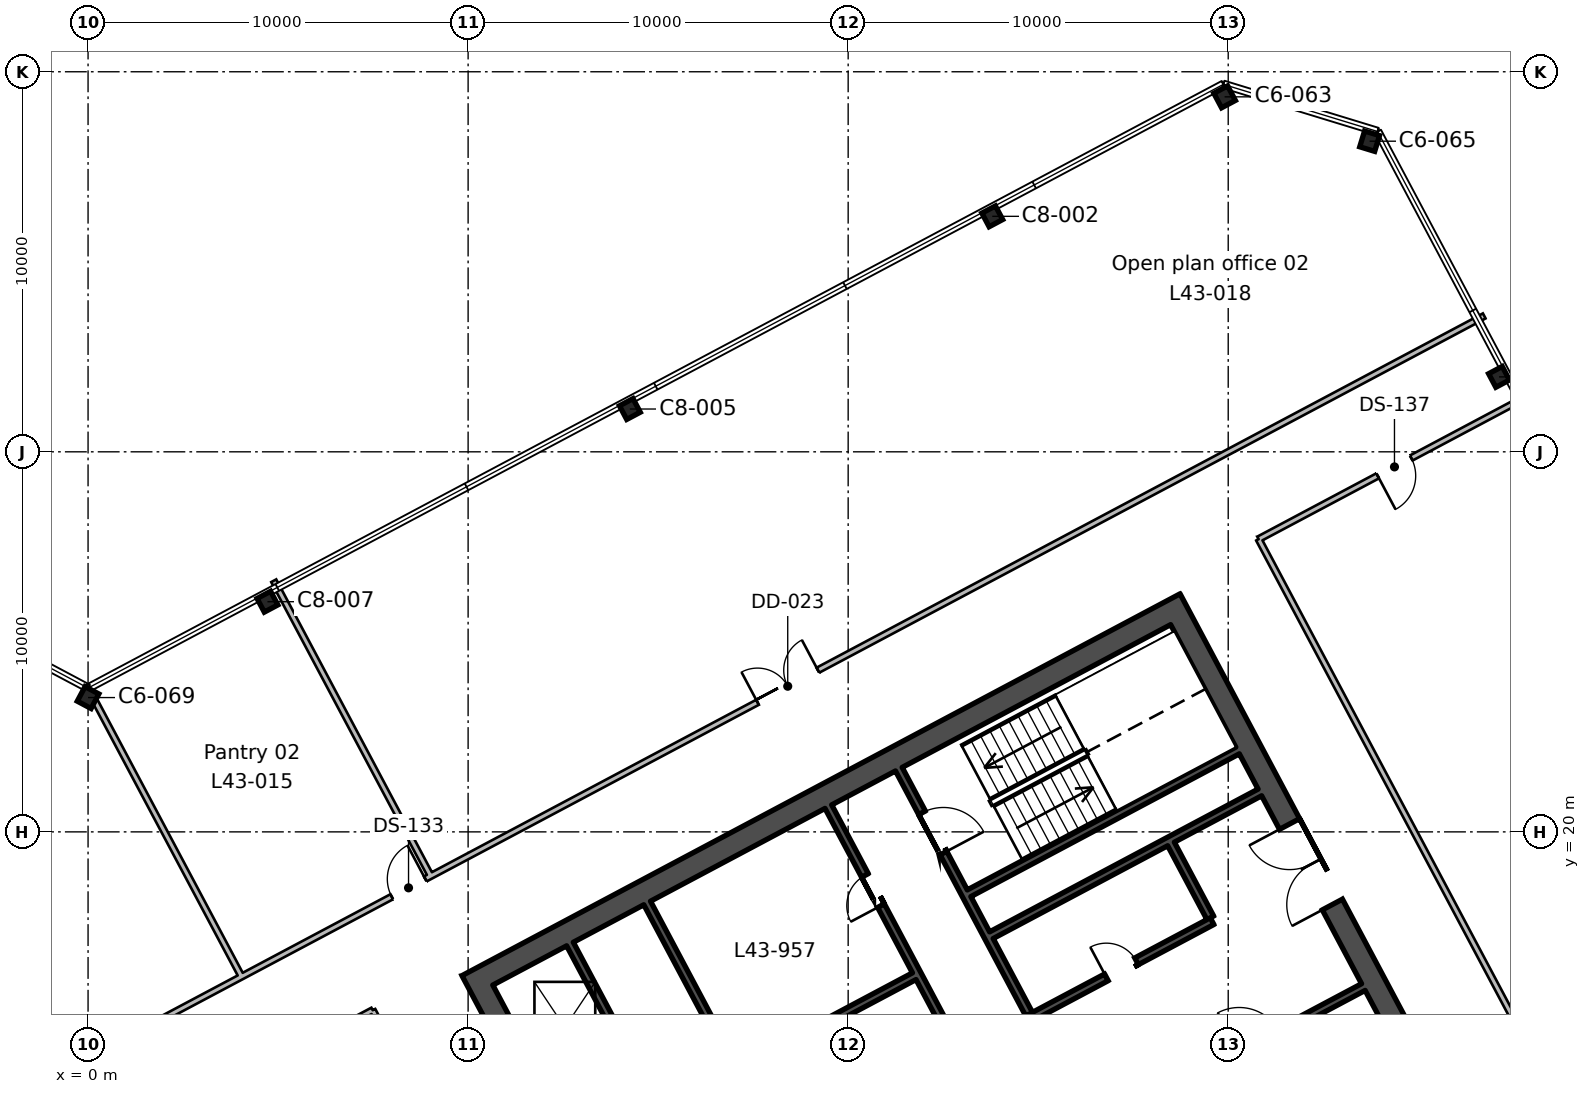
"""IFC4 building model, lengths in metres.
Left out: names, types, materials, properties, quantities, classifications, styles, units other than length and angle.
Written with IfcOpenShell. Run it as: python <this file> out.ifc"""

import sys

from ifc_helpers import new_model, si_unit, direction, frame, frame_2d, origin, origin_2d, place, context, subcontext, project, spatial, rectangle, i_section, extrude, element, fill, save


model = new_model("IFC4")
c1 = context("Model", 3, precision=1e-05, world=origin(), true_north=direction((0.0, 1.0)))
c2 = subcontext(c1, "Body", "Model", "MODEL_VIEW")
j1 = project(units=[si_unit("LENGTHUNIT", "METRE"), si_unit("PLANEANGLEUNIT", "RADIAN")], contexts=[c1])
p1 = place(None, origin())
s1 = spatial("IfcSite", under=j1, at=p1, CompositionType="ELEMENT")
p2 = place(p1, origin())
s2 = spatial("IfcBuilding", under=s1, at=p2, CompositionType="ELEMENT")
p3 = place(p2, frame((0.0, 0.0, 201.3)))
s3 = spatial("IfcBuildingStorey", under=s2, at=p3, CompositionType="ELEMENT", Elevation=201.3)
p4 = place(p3, frame((0.0, 23.534, 0.0), z_axis=(0.0, 0.0, 1.0), x_axis=(-0.882947592859, 0.469471562786, 0.0)))
e1 = element("IfcColumn", 1, at=p4, inside=s3, PredefinedType="COLUMN", context=c2, shape_type="SweptSolid", body=[
    extrude(i_section(OverallWidth=0.412, OverallDepth=0.434, WebThickness=0.036, FlangeThickness=0.057, FilletRadius=0.015, at=origin_2d()), origin(), (0.0, 0.0, 1.0), 3.9),
])
for number, where, z_axis, x_axis in (
    (2, (4.72, 26.056, 0.0), (0.0, 0.0, 1.0), (-0.883, -0.469, 0.0)),
    (3, (14.256, 31.126, 0.0), (0.0, 0.0, 1.0), (-0.883, -0.469, 0.0)),
    (4, (37.126, 31.972, 0.0), (0.0, 0.0, 1.0), (-0.469, 0.883, 0.0)),
    (5, (23.792, 36.196, 0.0), (0.0, 0.0, 1.0), (-0.883, -0.469, 0.0)),
):
    element("IfcColumn", number, at=place(p3, frame(where, z_axis=z_axis, x_axis=x_axis)), inside=s3, PredefinedType="COLUMN", context=c2, shape_type="SweptSolid", body=[
        extrude(i_section(OverallWidth=0.404, OverallDepth=0.406, WebThickness=0.027, FlangeThickness=0.044, FilletRadius=0.015, at=origin_2d()), origin(), (0.0, 0.0, 1.0), 3.9),
    ])
for number, where, z_axis, x_axis in (
    (6, (33.721, 38.173, 0.0), (0.0, 0.0, 1.0), (-0.956, 0.292, 0.0)),
    (7, (29.905, 39.34, 0.0), (0.0, 0.0, 1.0), (-0.883, -0.469, 0.0)),
):
    element("IfcColumn", number, at=place(p3, frame(where, z_axis=z_axis, x_axis=x_axis)), inside=s3, PredefinedType="COLUMN", context=c2, shape_type="SweptSolid", body=[
        extrude(i_section(OverallWidth=0.412, OverallDepth=0.434, WebThickness=0.036, FlangeThickness=0.057, FilletRadius=0.015, at=origin_2d()), origin(), (0.0, 0.0, 1.0), 3.9),
    ])
p5 = place(p3, frame((19.211, -0.771, 0.0), z_axis=(0.0, 0.0, 1.0), x_axis=(-0.469463742137, 0.882951751127, 0.0)))
e8 = element("IfcWall", 8, at=p5, inside=s3, PredefinedType="SHEAR", context=c2, shape_type="SweptSolid", body=[
    extrude(rectangle(XDim=19.4, YDim=0.6, at=frame_2d((9.7, 0.0))), origin(), (0.0, 0.0, 1.0), 3.9),
])
p6 = place(p5, frame((6.7, 0.0, 0.0)))
e9 = element("IfcOpeningElement", 9, at=p6, cuts=e8, PredefinedType="OPENING", context=c2, shape_type="SweptSolid", body=[
    extrude(rectangle(XDim=2.4, YDim=2.4, at=frame_2d((1.2, 1.2))), frame((0.0, 0.31, 0.0), z_axis=(0.0, -1.0, 0.0), x_axis=(1.0, 0.0, 0.0)), (0.0, 0.0, 1.0), 0.62),
])
p7 = place(p3, frame((37.576, 8.994, 0.0), z_axis=(0.0, 0.0, 1.0), x_axis=(-0.469478769487, 0.88294376095, 0.0)))
e10 = element("IfcWall", 10, at=p7, inside=s3, PredefinedType="SHEAR", context=c2, shape_type="SweptSolid", body=[
    extrude(rectangle(XDim=19.4, YDim=0.6, at=frame_2d((9.7, 0.0))), origin(), (0.0, 0.0, 1.0), 3.9),
])
p8 = place(p7, frame((10.3, 0.0, 0.0)))
e11 = element("IfcOpeningElement", 11, at=p8, cuts=e10, PredefinedType="OPENING", context=c2, shape_type="SweptSolid", body=[
    extrude(rectangle(XDim=2.4, YDim=2.4, at=frame_2d((1.2, 1.2))), frame((0.0, 0.31, 0.0), z_axis=(0.0, -1.0, 0.0), x_axis=(1.0, 0.0, 0.0)), (0.0, 0.0, 1.0), 0.62),
])
p9 = place(p3, frame((10.509, 16.234, 0.0), z_axis=(0.0, 0.0, 1.0), x_axis=(0.88295010195, 0.469466843842, 0.0)))
e12 = element("IfcWall", 12, at=p9, inside=s3, PredefinedType="SHEAR", context=c2, shape_type="SweptSolid", body=[
    extrude(rectangle(XDim=20.2, YDim=0.6, at=frame_2d((10.1, 0.0))), origin(), (0.0, 0.0, 1.0), 3.9),
])
p10 = place(p3, frame((14.394, 13.826, 0.0), z_axis=(0.0, 0.0, 1.0), x_axis=(-0.469494272526, 0.882935517501, 0.0)))
e13 = element("IfcWall", 13, at=p10, inside=s3, PredefinedType="SHEAR", context=c2, shape_type="SweptSolid", body=[
    extrude(rectangle(XDim=3.65, YDim=0.2, at=frame_2d((1.825, 0.0))), origin(), (0.0, 0.0, 1.0), 3.9),
])
p11 = place(p3, frame((18.138, 11.683, 0.0), z_axis=(0.0, 0.0, 1.0), x_axis=(-0.469480409012, 0.88294288918, 0.0)))
e14 = element("IfcWall", 14, at=p11, inside=s3, PredefinedType="SHEAR", context=c2, shape_type="SweptSolid", body=[
    extrude(rectangle(XDim=7.3, YDim=0.2, at=frame_2d((3.65, 0.0))), origin(), (0.0, 0.0, 1.0), 3.9),
])
p12 = place(p3, frame((22.906, 14.218, 0.0), z_axis=(0.0, 0.0, 1.0), x_axis=(-0.469480409012, 0.88294288918, 0.0)))
e15 = element("IfcWall", 15, at=p12, inside=s3, PredefinedType="SHEAR", context=c2, shape_type="SweptSolid", body=[
    extrude(rectangle(XDim=7.3, YDim=0.2, at=frame_2d((3.65, 0.0))), origin(), (0.0, 0.0, 1.0), 3.9),
])
p13 = place(p12, frame((4.35, 0.0, 0.0)))
e16 = element("IfcOpeningElement", 16, at=p13, cuts=e15, PredefinedType="OPENING", context=c2, shape_type="SweptSolid", body=[
    extrude(rectangle(XDim=0.9, YDim=2.1, at=frame_2d((0.45, 1.05))), frame((0.0, 0.11, 0.0), z_axis=(0.0, -1.0, 0.0), x_axis=(1.0, 0.0, 0.0)), (0.0, 0.0, 1.0), 0.22),
])
p14 = place(p3, frame((24.76, 15.204, 0.0), z_axis=(0.0, 0.0, 1.0), x_axis=(-0.469494272526, 0.882935517501, 0.0)))
e17 = element("IfcWall", 17, at=p14, inside=s3, PredefinedType="SHEAR", context=c2, shape_type="SweptSolid", body=[
    extrude(rectangle(XDim=7.3, YDim=0.2, at=frame_2d((3.65, 0.0))), origin(), (0.0, 0.0, 1.0), 3.9),
])
p15 = place(p14, frame((4.8, 0.0, 0.0)))
e18 = element("IfcOpeningElement", 18, at=p15, cuts=e17, PredefinedType="OPENING", context=c2, shape_type="SweptSolid", body=[
    extrude(rectangle(XDim=1.2, YDim=2.1, at=frame_2d((0.6, 1.05))), frame((0.0, 0.11, 0.0), z_axis=(0.0, -1.0, 0.0), x_axis=(1.0, 0.0, 0.0)), (0.0, 0.0, 1.0), 0.22),
])
p16 = place(p3, frame((29.528, 17.739, 0.0), z_axis=(0.0, 0.0, 1.0), x_axis=(-0.469401318492, 0.882984938828, 0.0)))
e19 = element("IfcWall", 19, at=p16, inside=s3, PredefinedType="SHEAR", context=c2, shape_type="SweptSolid", body=[
    extrude(rectangle(XDim=2.2, YDim=0.2, at=frame_2d((1.1, 0.0))), origin(), (0.0, 0.0, 1.0), 3.9),
])
p17 = place(p3, frame((24.726, 11.222, 0.0), z_axis=(0.0, 0.0, 1.0), x_axis=(0.882940221191, 0.469485426614, 0.0)))
e20 = element("IfcWall", 20, at=p17, inside=s3, PredefinedType="SHEAR", context=c2, shape_type="SweptSolid", body=[
    extrude(rectangle(XDim=10.0, YDim=0.2, at=frame_2d((5.0, 0.0))), origin(), (0.0, 0.0, 1.0), 3.9),
])
p18 = place(p17, frame((6.3, 0.0, 0.0)))
e21 = element("IfcOpeningElement", 21, at=p18, cuts=e20, PredefinedType="OPENING", context=c2, shape_type="SweptSolid", body=[
    extrude(rectangle(XDim=1.2, YDim=2.1, at=frame_2d((0.6, 1.05))), frame((0.0, 0.11, 0.0), z_axis=(0.0, -1.0, 0.0), x_axis=(1.0, 0.0, 0.0)), (0.0, 0.0, 1.0), 0.22),
])
p19 = place(p17, frame((2.25, 0.0, 0.0)))
e22 = element("IfcOpeningElement", 22, at=p19, cuts=e20, PredefinedType="OPENING", context=c2, shape_type="SweptSolid", body=[
    extrude(rectangle(XDim=0.9, YDim=2.1, at=frame_2d((0.45, 1.05))), frame((0.0, 0.11, 0.0), z_axis=(0.0, -1.0, 0.0), x_axis=(1.0, 0.0, 0.0)), (0.0, 0.0, 1.0), 0.22),
])
p20 = place(p3, frame((24.807, 15.116, 0.0), z_axis=(0.0, 0.0, 1.0), x_axis=(0.882942972946, 0.469480251476, 0.0)))
e23 = element("IfcWall", 23, at=p20, inside=s3, PredefinedType="SHEAR", context=c2, shape_type="SweptSolid", body=[
    extrude(rectangle(XDim=5.4, YDim=0.2, at=frame_2d((2.7, 0.0))), origin(), (0.0, 0.0, 1.0), 3.9),
])
p21 = place(p20, frame((2.25, 0.0, 0.0)))
e24 = element("IfcOpeningElement", 24, at=p21, cuts=e23, PredefinedType="OPENING", context=c2, shape_type="SweptSolid", body=[
    extrude(rectangle(XDim=0.9, YDim=2.1, at=frame_2d((0.45, 1.05))), frame((0.0, 0.11, 0.0), z_axis=(0.0, -1.0, 0.0), x_axis=(1.0, 0.0, 0.0)), (0.0, 0.0, 1.0), 0.22),
])
p22 = place(p3, frame((17.147, 13.761, 0.0), z_axis=(0.0, 0.0, 1.0), x_axis=(0.882964314875, 0.469440111896, 0.0)))
e25 = element("IfcWall", 25, at=p22, inside=s3, PredefinedType="SHEAR", context=c2, shape_type="SweptSolid", body=[
    extrude(rectangle(XDim=5.2, YDim=0.2, at=frame_2d((2.6, 0.0))), origin(), (0.0, 0.0, 1.0), 3.9),
])
p23 = place(p3, frame((23.769, 17.282, 0.0), z_axis=(0.0, 0.0, 1.0), x_axis=(0.882940221191, 0.469485426614, 0.0)))
e26 = element("IfcWall", 26, at=p23, inside=s3, PredefinedType="SHEAR", context=c2, shape_type="SweptSolid", body=[
    extrude(rectangle(XDim=8.0, YDim=0.2, at=frame_2d((4.0, 0.0))), origin(), (0.0, 0.0, 1.0), 3.9),
])
p24 = place(p3, frame((23.182, 18.385, 0.0), z_axis=(0.0, 0.0, 1.0), x_axis=(0.88295287151, 0.469461634952, 0.0)))
e27 = element("IfcWall", 27, at=p24, inside=s3, PredefinedType="SHEAR", context=c2, shape_type="SweptSolid", body=[
    extrude(rectangle(XDim=8.0, YDim=0.2, at=frame_2d((4.0, 0.0))), origin(), (0.0, 0.0, 1.0), 3.9),
])
p25 = place(p3, frame((-48.541, 39.854, 0.0), z_axis=(0.0, 0.0, 1.0), x_axis=(0.882945008423, -0.469476423372, 0.0)))
e28 = element("IfcWall", 28, at=p25, inside=s3, PredefinedType="PARTITIONING", context=c2, shape_type="SweptSolid", body=[
    extrude(rectangle(XDim=54.976, YDim=0.15, at=frame_2d((27.488, 0.0))), origin(), (0.0, 0.0, 1.0), 3.54),
])
p26 = place(p25, frame((39.35, 0.0, 0.0)))
e29 = element("IfcOpeningElement", 29, at=p26, cuts=e28, PredefinedType="OPENING", context=c2, shape_type="SweptSolid", body=[
    extrude(rectangle(XDim=1.0, YDim=2.1, at=frame_2d((0.5, 1.05))), frame((0.0, 0.085, 0.0), z_axis=(0.0, -1.0, 0.0), x_axis=(1.0, 0.0, 0.0)), (0.0, 0.0, 1.0), 0.17),
])
p27 = place(p25, frame((28.05, 0.0, 0.0)))
e30 = element("IfcOpeningElement", 30, at=p27, cuts=e28, PredefinedType="OPENING", context=c2, shape_type="SweptSolid", body=[
    extrude(rectangle(XDim=1.0, YDim=2.1, at=frame_2d((0.5, 1.05))), frame((0.0, 0.085, 0.0), z_axis=(0.0, -1.0, 0.0), x_axis=(1.0, 0.0, 0.0)), (0.0, 0.0, 1.0), 0.17),
])
p28 = place(p25, frame((26.449, 0.0, 0.0)))
e31 = element("IfcOpeningElement", 31, at=p28, cuts=e28, PredefinedType="OPENING", context=c2, shape_type="SweptSolid", body=[
    extrude(rectangle(XDim=1.0, YDim=2.1, at=frame_2d((0.5, 1.05))), frame((0.0, 0.085, 0.0), z_axis=(0.0, -1.0, 0.0), x_axis=(1.0, 0.0, 0.0)), (0.0, 0.0, 1.0), 0.17),
])
p29 = place(p25, frame((15.35, 0.0, 0.0)))
e32 = element("IfcOpeningElement", 32, at=p29, cuts=e28, PredefinedType="OPENING", context=c2, shape_type="SweptSolid", body=[
    extrude(rectangle(XDim=1.0, YDim=2.1, at=frame_2d((0.5, 1.05))), frame((0.0, 0.085, 0.0), z_axis=(0.0, -1.0, 0.0), x_axis=(1.0, 0.0, 0.0)), (0.0, 0.0, 1.0), 0.17),
])
p30 = place(p3, frame((0.0, 14.044, 0.0), z_axis=(0.0, 0.0, 1.0), x_axis=(0.882962129795, 0.469444221764, 0.0)))
e33 = element("IfcWall", 33, at=p30, inside=s3, PredefinedType="PARTITIONING", context=c2, shape_type="SweptSolid", body=[
    extrude(rectangle(XDim=41.607, YDim=0.15, at=frame_2d((20.803, 0.0))), origin(), (0.0, 0.0, 1.0), 3.54),
])
p31 = place(p30, frame((19.95, 0.0, 0.0)))
e34 = element("IfcOpeningElement", 34, at=p31, cuts=e33, PredefinedType="OPENING", context=c2, shape_type="SweptSolid", body=[
    extrude(rectangle(XDim=1.8, YDim=2.1, at=frame_2d((0.9, 1.05))), frame((0.0, 0.085, 0.0), z_axis=(0.0, -1.0, 0.0), x_axis=(1.0, 0.0, 0.0)), (0.0, 0.0, 1.0), 0.17),
])
p32 = place(p30, frame((9.05, 0.0, 0.0)))
e35 = element("IfcOpeningElement", 35, at=p32, cuts=e33, PredefinedType="OPENING", context=c2, shape_type="SweptSolid", body=[
    extrude(rectangle(XDim=1.0, YDim=2.1, at=frame_2d((0.5, 1.05))), frame((0.0, 0.085, 0.0), z_axis=(0.0, -1.0, 0.0), x_axis=(1.0, 0.0, 0.0)), (0.0, 0.0, 1.0), 0.17),
])
p33 = place(p3, frame((0.183, 23.44, 0.0), z_axis=(0.0, 0.0, 1.0), x_axis=(0.469529135479, -0.882916978507, 0.0)))
e36 = element("IfcWall", 36, at=p33, inside=s3, PredefinedType="PARTITIONING", context=c2, shape_type="SweptSolid", body=[
    extrude(rectangle(XDim=8.21, YDim=0.15, at=frame_2d((4.105, 0.0))), origin(), (0.0, 0.0, 1.0), 3.54),
])
p34 = place(p3, frame((4.885, 26.608, 0.0), z_axis=(0.0, 0.0, 1.0), x_axis=(0.469445946219, -0.882961212952, 0.0)))
e37 = element("IfcWall", 37, at=p34, inside=s3, PredefinedType="PARTITIONING", context=c2, shape_type="SweptSolid", body=[
    extrude(rectangle(XDim=8.8, YDim=0.15, at=frame_2d((4.4, 0.0))), origin(), (0.0, 0.0, 1.0), 3.54),
])
p35 = place(p3, frame((37.863, 31.458, 0.0), z_axis=(0.0, 0.0, 1.0), x_axis=(-0.882914115089, -0.469534519898, 0.0)))
e38 = element("IfcWall", 38, at=p35, inside=s3, PredefinedType="PARTITIONING", context=c2, shape_type="SweptSolid", body=[
    extrude(rectangle(XDim=8.0, YDim=0.15, at=frame_2d((4.0, 0.0))), origin(), (0.0, 0.0, 1.0), 3.54),
])
p36 = place(p35, frame((3.451, 0.0, 0.0)))
e39 = element("IfcOpeningElement", 39, at=p36, cuts=e38, PredefinedType="OPENING", context=c2, shape_type="SweptSolid", body=[
    extrude(rectangle(XDim=1.0, YDim=2.1, at=frame_2d((0.5, 1.05))), frame((0.0, 0.085, 0.0), z_axis=(0.0, -1.0, 0.0), x_axis=(1.0, 0.0, 0.0)), (0.0, 0.0, 1.0), 0.17),
])
p37 = place(p3, frame((30.8, 27.702, 0.0), z_axis=(0.0, 0.0, 1.0), x_axis=(0.469451816494, -0.882958091865, 0.0)))
e40 = element("IfcWall", 40, at=p37, inside=s3, PredefinedType="PARTITIONING", context=c2, shape_type="SweptSolid", body=[
    extrude(rectangle(XDim=20.0, YDim=0.15, at=frame_2d((10.0, 0.0))), origin(), (0.0, 0.0, 1.0), 3.54),
])
p38 = place(p3, frame((8.292, 13.8, 0.0), z_axis=(0.0, 0.0, 1.0), x_axis=(-0.469541856947, 0.882910213201, 0.0)))
e41 = element("IfcWall", 41, at=p38, inside=s3, PredefinedType="PARTITIONING", context=c2, shape_type="SweptSolid", body=[
    extrude(rectangle(XDim=1.708, YDim=0.15, at=frame_2d((0.854, 0.0))), origin(), (0.0, 0.0, 1.0), 3.54),
])
p39 = place(p3, frame((7.49, 15.308, 0.0), z_axis=(0.0, 0.0, 1.0), x_axis=(-0.882993690295, -0.469384855848, 0.0)))
e42 = element("IfcWall", 42, at=p39, inside=s3, PredefinedType="PARTITIONING", context=c2, shape_type="SweptSolid", body=[
    extrude(rectangle(XDim=3.213, YDim=0.15, at=frame_2d((1.606, 0.0))), origin(), (0.0, 0.0, 1.0), 3.54),
])
p40 = place(p8, origin())
e43 = element("IfcDoor", 43, at=p40, inside=s3, OperationType="DOUBLE_DOOR_SINGLE_SWING", PredefinedType="DOOR", context=c2, shape_type="SweptSolid", body=[
    extrude(rectangle(XDim=2.4, YDim=2.4, at=frame_2d((1.2, 1.2))), frame((0.0, 0.025, 0.0), z_axis=(0.0, -1.0, 0.0), x_axis=(1.0, 0.0, 0.0)), (0.0, 0.0, 1.0), 0.05),
])
fill(e11, e43)
p41 = place(p15, frame((1.2, 0.0, 0.0), z_axis=(0.0, 0.0, 1.0), x_axis=(-1.0, 0.0, 0.0)))
e44 = element("IfcDoor", 44, at=p41, inside=s3, OperationType="SINGLE_SWING_RIGHT", PredefinedType="DOOR", context=c2, shape_type="SweptSolid", body=[
    extrude(rectangle(XDim=1.2, YDim=2.1, at=frame_2d((0.6, 1.05))), frame((0.0, 0.025, 0.0), z_axis=(0.0, -1.0, 0.0), x_axis=(1.0, 0.0, 0.0)), (0.0, 0.0, 1.0), 0.05),
])
fill(e18, e44)
p42 = place(p21, origin())
e45 = element("IfcDoor", 45, at=p42, inside=s3, OperationType="SINGLE_SWING_LEFT", PredefinedType="DOOR", context=c2, shape_type="SweptSolid", body=[
    extrude(rectangle(XDim=0.9, YDim=2.1, at=frame_2d((0.45, 1.05))), frame((0.0, 0.025, 0.0), z_axis=(0.0, -1.0, 0.0), x_axis=(1.0, 0.0, 0.0)), (0.0, 0.0, 1.0), 0.05),
])
fill(e24, e45)
p43 = place(p13, origin())
e46 = element("IfcDoor", 46, at=p43, inside=s3, OperationType="SINGLE_SWING_LEFT", PredefinedType="DOOR", context=c2, shape_type="SweptSolid", body=[
    extrude(rectangle(XDim=0.9, YDim=2.1, at=frame_2d((0.45, 1.05))), frame((0.0, 0.025, 0.0), z_axis=(0.0, -1.0, 0.0), x_axis=(1.0, 0.0, 0.0)), (0.0, 0.0, 1.0), 0.05),
])
fill(e16, e46)
p44 = place(p31, origin())
e47 = element("IfcDoor", 47, at=p44, inside=s3, OperationType="DOUBLE_DOOR_SINGLE_SWING", PredefinedType="DOOR", context=c2, shape_type="SweptSolid", body=[
    extrude(rectangle(XDim=1.8, YDim=2.1, at=frame_2d((0.9, 1.05))), frame((0.0, 0.025, 0.0), z_axis=(0.0, -1.0, 0.0), x_axis=(1.0, 0.0, 0.0)), (0.0, 0.0, 1.0), 0.05),
])
fill(e34, e47)
p45 = place(p32, origin())
e48 = element("IfcDoor", 48, at=p45, inside=s3, OperationType="SINGLE_SWING_RIGHT", PredefinedType="DOOR", context=c2, shape_type="SweptSolid", body=[
    extrude(rectangle(XDim=1.0, YDim=2.1, at=frame_2d((0.5, 1.05))), frame((0.0, 0.025, 0.0), z_axis=(0.0, -1.0, 0.0), x_axis=(1.0, 0.0, 0.0)), (0.0, 0.0, 1.0), 0.05),
])
fill(e35, e48)
p46 = place(p36, origin())
e49 = element("IfcDoor", 49, at=p46, inside=s3, OperationType="SINGLE_SWING_RIGHT", PredefinedType="DOOR", context=c2, shape_type="SweptSolid", body=[
    extrude(rectangle(XDim=1.0, YDim=2.1, at=frame_2d((0.5, 1.05))), frame((0.0, 0.025, 0.0), z_axis=(0.0, -1.0, 0.0), x_axis=(1.0, 0.0, 0.0)), (0.0, 0.0, 1.0), 0.05),
])
fill(e39, e49)
save(model, sys.argv[1])
